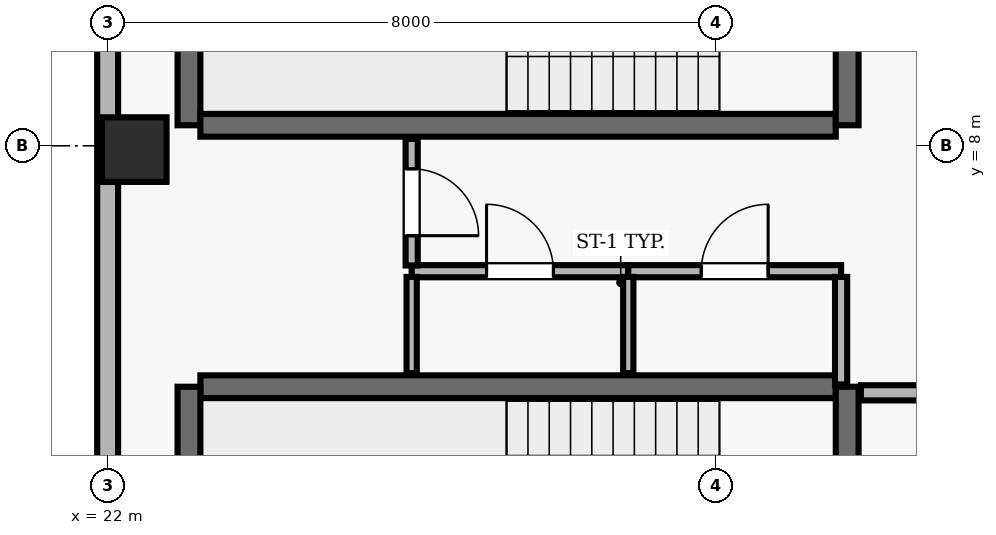
"""IFC4 building model, lengths in metres.
Left out: names, types, materials, properties, quantities, classifications, styles, units other than length and angle.
Written with IfcOpenShell. Run it as: python <this file> out.ifc"""

import sys

from ifc_helpers import new_model, si_unit, direction, frame, frame_2d, origin, origin_2d, place, context, subcontext, project, spatial, rectangle, extrude, element, fill, save


model = new_model("IFC4")
c1 = context("Model", 3, precision=1e-05, world=origin(), true_north=direction((0.0, 1.0)))
c2 = subcontext(c1, "Body", "Model", "MODEL_VIEW")
j1 = project(units=[si_unit("LENGTHUNIT", "METRE"), si_unit("PLANEANGLEUNIT", "RADIAN")], contexts=[c1])
p1 = place(None, origin())
s1 = spatial("IfcSite", under=j1, at=p1, CompositionType="ELEMENT")
p2 = place(p1, origin())
s2 = spatial("IfcBuilding", under=s1, at=p2, CompositionType="ELEMENT")
p3 = place(p2, frame((0.0, 0.0, 298.9)))
s3 = spatial("IfcBuildingStorey", under=s2, at=p3, CompositionType="ELEMENT", Elevation=298.9)
p4 = place(p3, frame((22.35, 7.95, 0.0), z_axis=(0.0, 0.0, 1.0), x_axis=(1.0, 0.0, 0.0)))
e1 = element("IfcColumn", 1, at=p4, inside=s3, PredefinedType="COLUMN", context=c2, shape_type="SweptSolid", body=[
    extrude(rectangle(XDim=0.85, YDim=0.85, at=origin_2d()), origin(), (0.0, 0.0, 1.0), 3.9),
])
p5 = place(p3, frame((22.0, 35.3, 0.0), z_axis=(0.0, 0.0, 1.0), x_axis=(0.0, -1.0, 0.0)))
e2 = element("IfcWall", 2, at=p5, inside=s3, PredefinedType="SOLIDWALL", context=c2, shape_type="SweptSolid", body=[
    extrude(rectangle(XDim=32.8, YDim=0.275, at=frame_2d((16.4, 0.0))), origin(), (0.0, 0.0, 1.0), 3.69),
])
p6 = place(p5, frame((7.3, 0.0, 0.0)))
e3 = element("IfcOpeningElement", 3, at=p6, cuts=e2, PredefinedType="OPENING", context=c2, shape_type="SweptSolid", body=[
    extrude(rectangle(XDim=1.0, YDim=2.2, at=frame_2d((0.5, 1.1))), frame((0.0, 0.147, 0.0), z_axis=(0.0, -1.0, 0.0), x_axis=(1.0, 0.0, 0.0)), (0.0, 0.0, 1.0), 0.295),
])
p7 = place(p5, frame((1.083, 0.0, 0.9)))
e4 = element("IfcOpeningElement", 4, at=p7, cuts=e2, PredefinedType="OPENING", context=c2, shape_type="SweptSolid", body=[
    extrude(rectangle(XDim=1.5, YDim=1.6, at=frame_2d((0.75, 0.8))), frame((0.0, 0.147, 0.0), z_axis=(0.0, -1.0, 0.0), x_axis=(1.0, 0.0, 0.0)), (0.0, 0.0, 1.0), 0.295),
])
p8 = place(p5, frame((12.917, 0.0, 0.9)))
e5 = element("IfcOpeningElement", 5, at=p8, cuts=e2, PredefinedType="OPENING", context=c2, shape_type="SweptSolid", body=[
    extrude(rectangle(XDim=1.5, YDim=1.6, at=frame_2d((0.75, 0.8))), frame((0.0, 0.147, 0.0), z_axis=(0.0, -1.0, 0.0), x_axis=(1.0, 0.0, 0.0)), (0.0, 0.0, 1.0), 0.295),
])
p9 = place(p5, frame((18.383, 0.0, 0.9)))
e6 = element("IfcOpeningElement", 6, at=p9, cuts=e2, PredefinedType="OPENING", context=c2, shape_type="SweptSolid", body=[
    extrude(rectangle(XDim=1.5, YDim=1.6, at=frame_2d((0.75, 0.8))), frame((0.0, 0.147, 0.0), z_axis=(0.0, -1.0, 0.0), x_axis=(1.0, 0.0, 0.0)), (0.0, 0.0, 1.0), 0.295),
])
p10 = place(p5, frame((23.85, 0.0, 0.9)))
e7 = element("IfcOpeningElement", 7, at=p10, cuts=e2, PredefinedType="OPENING", context=c2, shape_type="SweptSolid", body=[
    extrude(rectangle(XDim=1.5, YDim=1.6, at=frame_2d((0.75, 0.8))), frame((0.0, 0.147, 0.0), z_axis=(0.0, -1.0, 0.0), x_axis=(1.0, 0.0, 0.0)), (0.0, 0.0, 1.0), 0.295),
])
p11 = place(p3, frame((31.58, 4.83, 0.0), z_axis=(0.0, 0.0, 1.0), x_axis=(-1.0, 0.0, 0.0)))
e8 = element("IfcWall", 8, at=p11, inside=s3, PredefinedType="SHEAR", context=c2, shape_type="SweptSolid", body=[
    extrude(rectangle(XDim=8.36, YDim=0.3, at=frame_2d((4.18, 0.0))), origin(), (0.0, 0.0, 1.0), 3.69),
])
p12 = place(p3, frame((23.07, 4.83, 0.0), z_axis=(0.0, 0.0, 1.0), x_axis=(0.0, -1.0, 0.0)))
e9 = element("IfcWall", 9, at=p12, inside=s3, PredefinedType="SHEAR", context=c2, shape_type="SweptSolid", body=[
    extrude(rectangle(XDim=3.51, YDim=0.3, at=frame_2d((1.755, 0.0))), origin(), (0.0, 0.0, 1.0), 3.69),
])
p13 = place(p3, frame((31.73, 0.96, 0.0), z_axis=(0.0, 0.0, 1.0), x_axis=(0.0, 1.0, 0.0)))
e10 = element("IfcWall", 10, at=p13, inside=s3, PredefinedType="SHEAR", context=c2, shape_type="SweptSolid", body=[
    extrude(rectangle(XDim=3.87, YDim=0.3, at=frame_2d((1.935, 0.0))), origin(), (0.0, 0.0, 1.0), 3.69),
])
p14 = place(p13, frame((1.54, 0.0, 0.0)))
e11 = element("IfcOpeningElement", 11, at=p14, cuts=e10, PredefinedType="OPENING", context=c2, shape_type="SweptSolid", body=[
    extrude(rectangle(XDim=1.15, YDim=2.15, at=frame_2d((0.575, 1.075))), frame((0.0, 0.16, 0.0), z_axis=(0.0, -1.0, 0.0), x_axis=(1.0, 0.0, 0.0)), (0.0, 0.0, 1.0), 0.32),
])
p15 = place(p3, frame((23.07, 11.78, 0.0), z_axis=(0.0, 0.0, 1.0), x_axis=(0.0, -1.0, 0.0)))
e12 = element("IfcWall", 12, at=p15, inside=s3, PredefinedType="SHEAR", context=c2, shape_type="SweptSolid", body=[
    extrude(rectangle(XDim=3.51, YDim=0.3, at=frame_2d((1.755, 0.0))), origin(), (0.0, 0.0, 1.0), 3.69),
])
p16 = place(p3, frame((23.22, 8.27, 0.0), z_axis=(0.0, 0.0, 1.0), x_axis=(1.0, 0.0, 0.0)))
e13 = element("IfcWall", 13, at=p16, inside=s3, PredefinedType="SHEAR", context=c2, shape_type="SweptSolid", body=[
    extrude(rectangle(XDim=8.36, YDim=0.3, at=frame_2d((4.18, 0.0))), origin(), (0.0, 0.0, 1.0), 3.69),
])
p17 = place(p3, frame((31.73, 8.27, 0.0), z_axis=(0.0, 0.0, 1.0), x_axis=(0.0, 1.0, 0.0)))
e14 = element("IfcWall", 14, at=p17, inside=s3, PredefinedType="SHEAR", context=c2, shape_type="SweptSolid", body=[
    extrude(rectangle(XDim=3.51, YDim=0.3, at=frame_2d((1.755, 0.0))), origin(), (0.0, 0.0, 1.0), 3.69),
])
p18 = place(p17, frame((1.18, 0.0, 0.0)))
e15 = element("IfcOpeningElement", 15, at=p18, cuts=e14, PredefinedType="OPENING", context=c2, shape_type="SweptSolid", body=[
    extrude(rectangle(XDim=1.15, YDim=2.15, at=frame_2d((0.575, 1.075))), frame((0.0, 0.16, 0.0), z_axis=(0.0, -1.0, 0.0), x_axis=(1.0, 0.0, 0.0)), (0.0, 0.0, 1.0), 0.32),
])
p19 = place(p3, frame((26.0, 6.35, 0.0), z_axis=(0.0, 0.0, 1.0), x_axis=(1.0, 0.0, 0.0)))
e16 = element("IfcWall", 16, at=p19, inside=s3, PredefinedType="PARTITIONING", context=c2, shape_type="SweptSolid", body=[
    extrude(rectangle(XDim=2.85, YDim=0.16, at=frame_2d((1.425, 0.0))), origin(), (0.0, 0.0, 1.0), 3.69),
])
p20 = place(p19, frame((0.985, 0.0, 0.0)))
e17 = element("IfcOpeningElement", 17, at=p20, cuts=e16, PredefinedType="OPENING", context=c2, shape_type="SweptSolid", body=[
    extrude(rectangle(XDim=0.88, YDim=2.1, at=frame_2d((0.44, 1.05))), frame((0.0, 0.09, 0.0), z_axis=(0.0, -1.0, 0.0), x_axis=(1.0, 0.0, 0.0)), (0.0, 0.0, 1.0), 0.18),
])
p21 = place(p3, frame((28.85, 6.35, 0.0), z_axis=(0.0, 0.0, 1.0), x_axis=(1.0, 0.0, 0.0)))
e18 = element("IfcWall", 18, at=p21, inside=s3, PredefinedType="PARTITIONING", context=c2, shape_type="SweptSolid", body=[
    extrude(rectangle(XDim=2.8, YDim=0.16, at=frame_2d((1.4, 0.0))), origin(), (0.0, 0.0, 1.0), 3.69),
])
p22 = place(p21, frame((0.96, 0.0, 0.0)))
e19 = element("IfcOpeningElement", 19, at=p22, cuts=e18, PredefinedType="OPENING", context=c2, shape_type="SweptSolid", body=[
    extrude(rectangle(XDim=0.88, YDim=2.1, at=frame_2d((0.44, 1.05))), frame((0.0, 0.09, 0.0), z_axis=(0.0, -1.0, 0.0), x_axis=(1.0, 0.0, 0.0)), (0.0, 0.0, 1.0), 0.18),
])
p23 = place(p3, frame((35.02, 4.75, 0.0), z_axis=(0.0, 0.0, 1.0), x_axis=(-1.0, 0.0, 0.0)))
e20 = element("IfcWall", 20, at=p23, inside=s3, PredefinedType="SOLIDWALL", context=c2, shape_type="SweptSolid", body=[
    extrude(rectangle(XDim=3.11, YDim=0.2, at=frame_2d((1.555, 0.0))), origin(), (0.0, 0.0, 1.0), 3.69),
])
p24 = place(p23, frame((1.03, 0.0, 0.0)))
e21 = element("IfcOpeningElement", 21, at=p24, cuts=e20, PredefinedType="OPENING", context=c2, shape_type="SweptSolid", body=[
    extrude(rectangle(XDim=1.05, YDim=2.15, at=frame_2d((0.525, 1.075))), frame((0.0, 0.11, 0.0), z_axis=(0.0, -1.0, 0.0), x_axis=(1.0, 0.0, 0.0)), (0.0, 0.0, 1.0), 0.22),
])
p25 = place(p3, frame((26.0, 5.01, 0.0), z_axis=(0.0, 0.0, 1.0), x_axis=(0.0, 1.0, 0.0)))
e22 = element("IfcWall", 22, at=p25, inside=s3, PredefinedType="PARTITIONING", context=c2, shape_type="SweptSolid", body=[
    extrude(rectangle(XDim=1.265, YDim=0.135, at=frame_2d((0.632, 0.0))), origin(), (0.0, 0.0, 1.0), 3.69),
])
p26 = place(p3, frame((26.0, 8.09, 0.0), z_axis=(0.0, 0.0, 1.0), x_axis=(0.0, -1.0, 0.0)))
e23 = element("IfcWall", 23, at=p26, inside=s3, PredefinedType="PARTITIONING", context=c2, shape_type="SweptSolid", body=[
    extrude(rectangle(XDim=1.665, YDim=0.16, at=frame_2d((0.833, 0.0))), origin(), (0.0, 0.0, 1.0), 3.69),
])
p27 = place(p26, frame((0.393, 0.0, 0.0)))
e24 = element("IfcOpeningElement", 24, at=p27, cuts=e23, PredefinedType="OPENING", context=c2, shape_type="SweptSolid", body=[
    extrude(rectangle(XDim=0.88, YDim=2.1, at=frame_2d((0.44, 1.05))), frame((0.0, 0.09, 0.0), z_axis=(0.0, -1.0, 0.0), x_axis=(1.0, 0.0, 0.0)), (0.0, 0.0, 1.0), 0.18),
])
p28 = place(p3, frame((28.85, 5.01, 0.0), z_axis=(0.0, 0.0, 1.0), x_axis=(0.0, 1.0, 0.0)))
e25 = element("IfcWall", 25, at=p28, inside=s3, PredefinedType="PARTITIONING", context=c2, shape_type="SweptSolid", body=[
    extrude(rectangle(XDim=1.265, YDim=0.135, at=frame_2d((0.632, 0.0))), origin(), (0.0, 0.0, 1.0), 3.69),
])
p29 = place(p3, frame((31.65, 4.86, 0.0), z_axis=(0.0, 0.0, 1.0), x_axis=(0.0, 1.0, 0.0)))
e26 = element("IfcWall", 26, at=p29, inside=s3, PredefinedType="PARTITIONING", context=c2, shape_type="SweptSolid", body=[
    extrude(rectangle(XDim=1.415, YDim=0.16, at=frame_2d((0.708, 0.0))), origin(), (0.0, 0.0, 1.0), 3.69),
])
p30 = place(p27, origin())
e27 = element("IfcDoor", 27, at=p30, inside=s3, OperationType="SINGLE_SWING_RIGHT", PredefinedType="DOOR", context=c2, shape_type="SweptSolid", body=[
    extrude(rectangle(XDim=0.88, YDim=2.1, at=frame_2d((0.44, 1.05))), frame((0.0, 0.025, 0.0), z_axis=(0.0, -1.0, 0.0), x_axis=(1.0, 0.0, 0.0)), (0.0, 0.0, 1.0), 0.05),
])
fill(e24, e27)
p31 = place(p20, origin())
e28 = element("IfcDoor", 28, at=p31, inside=s3, OperationType="SINGLE_SWING_LEFT", PredefinedType="DOOR", context=c2, shape_type="SweptSolid", body=[
    extrude(rectangle(XDim=0.88, YDim=2.1, at=frame_2d((0.44, 1.05))), frame((0.0, 0.025, 0.0), z_axis=(0.0, -1.0, 0.0), x_axis=(1.0, 0.0, 0.0)), (0.0, 0.0, 1.0), 0.05),
])
fill(e17, e28)
p32 = place(p22, origin())
e29 = element("IfcDoor", 29, at=p32, inside=s3, OperationType="SINGLE_SWING_RIGHT", PredefinedType="DOOR", context=c2, shape_type="SweptSolid", body=[
    extrude(rectangle(XDim=0.88, YDim=2.1, at=frame_2d((0.44, 1.05))), frame((0.0, 0.025, 0.0), z_axis=(0.0, -1.0, 0.0), x_axis=(1.0, 0.0, 0.0)), (0.0, 0.0, 1.0), 0.05),
])
fill(e19, e29)
save(model, sys.argv[1])
